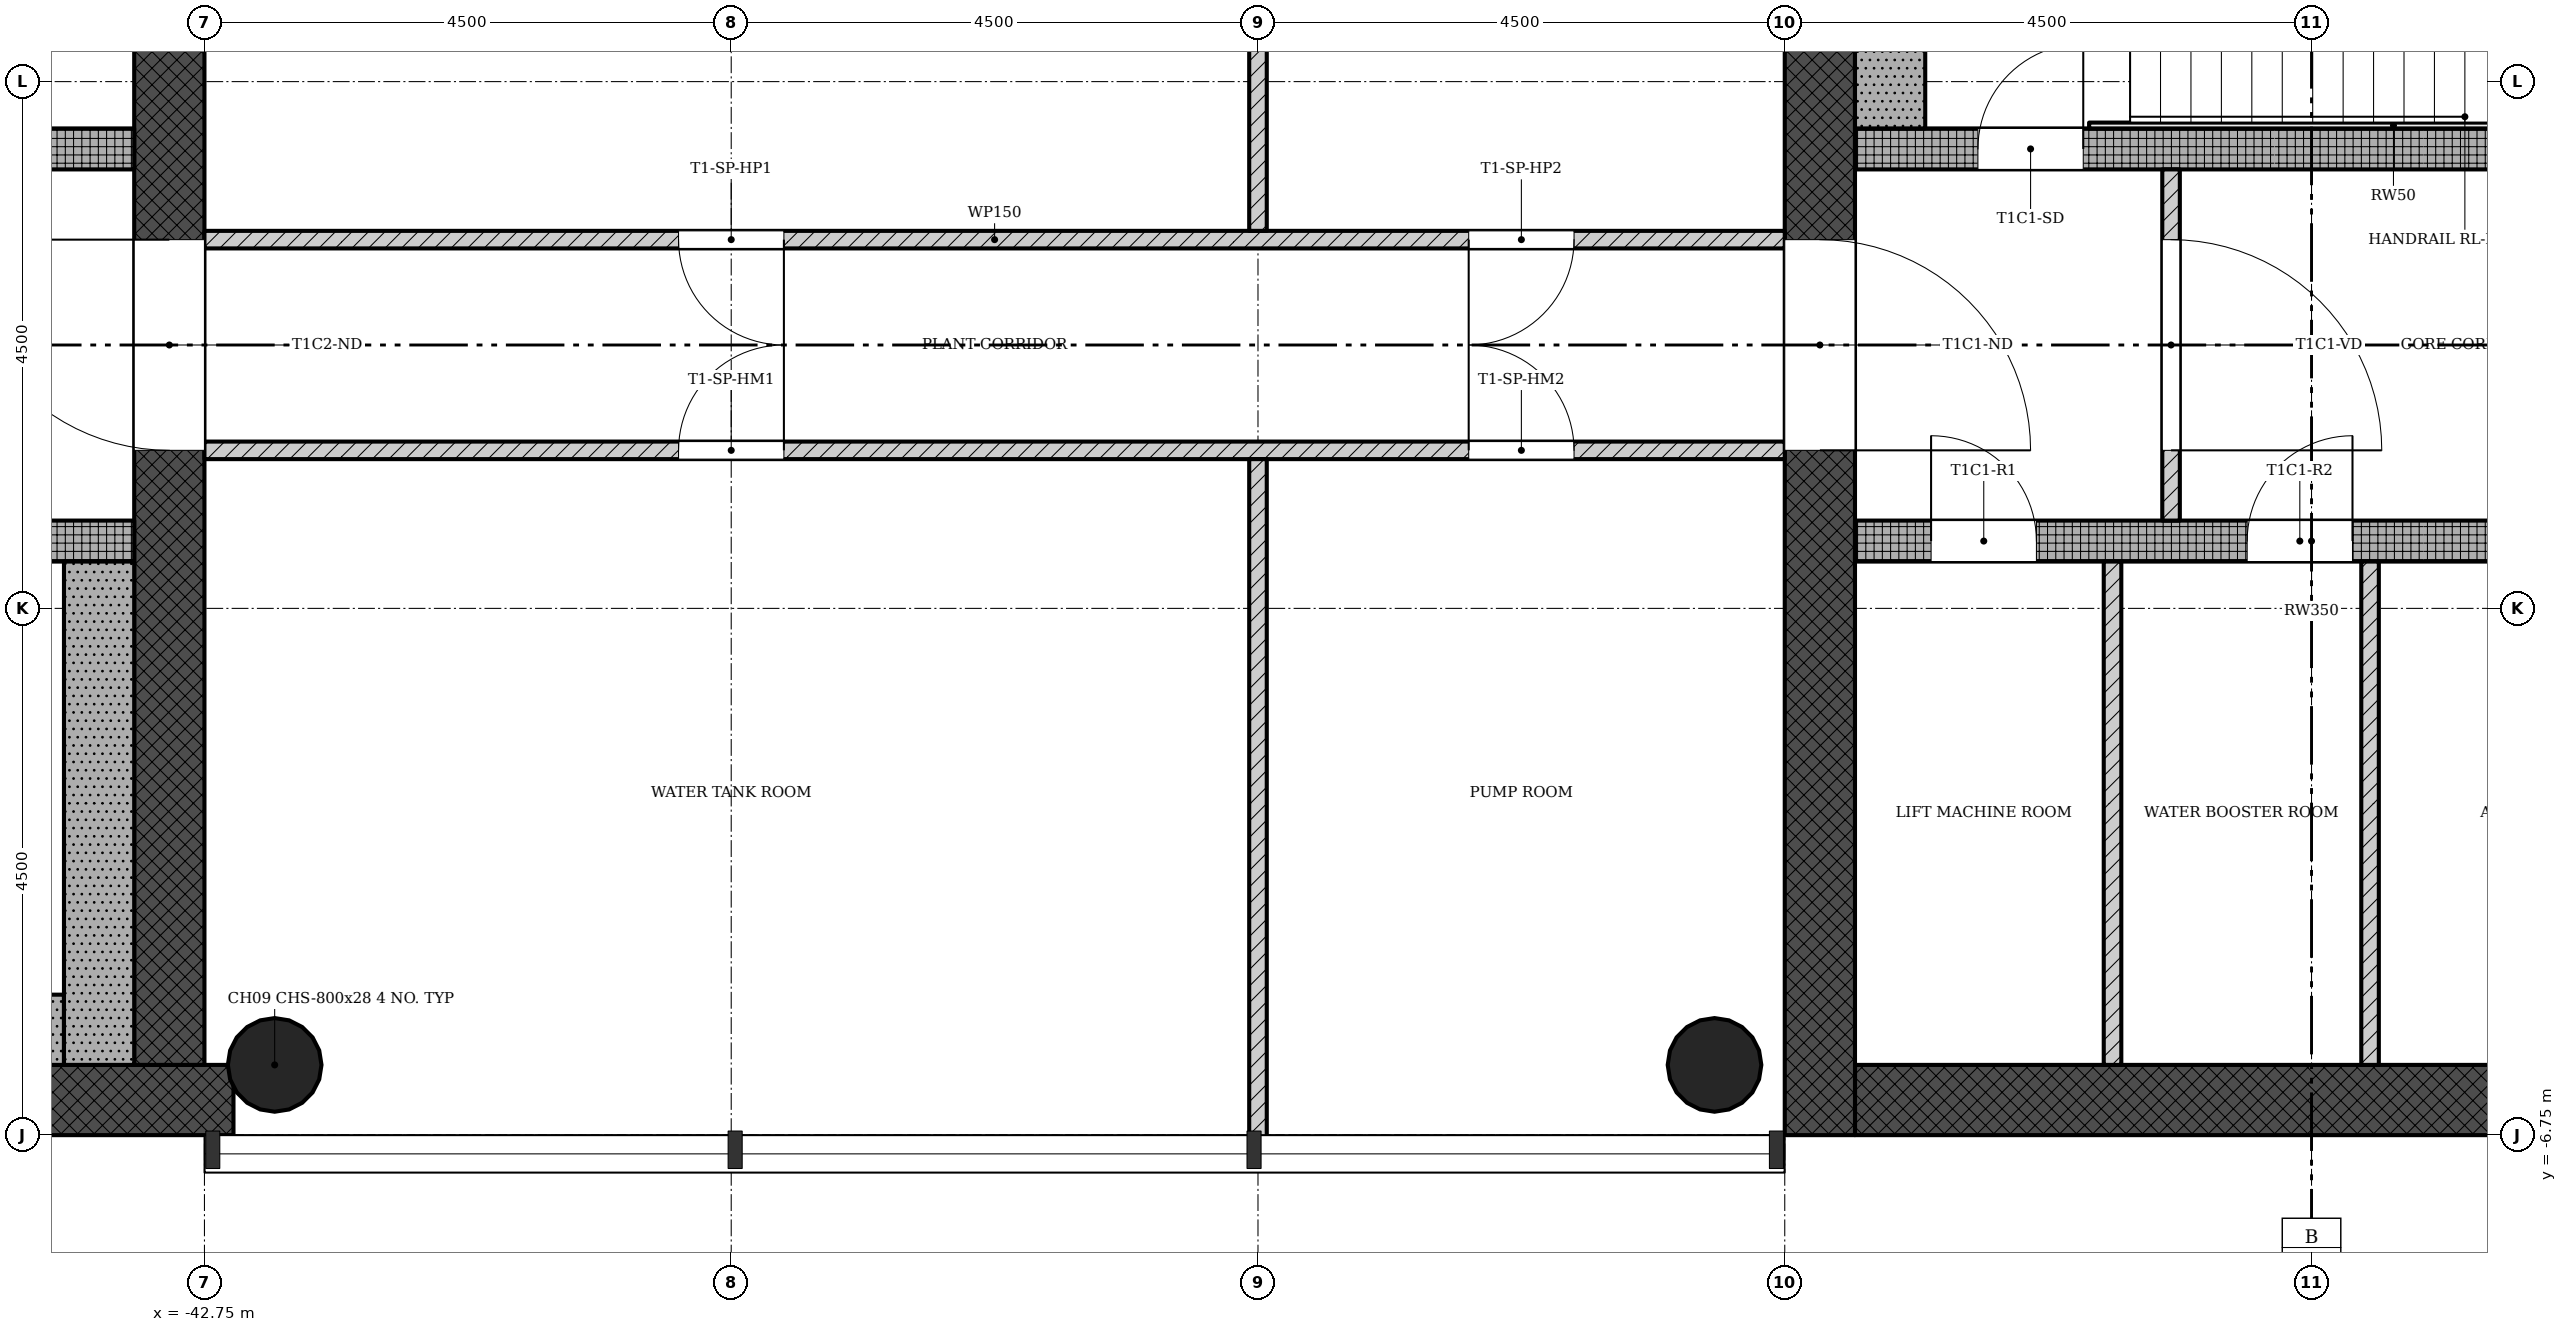
"""IFC4 building model, lengths in metres.
Left out: names, types, materials, properties, quantities, classifications, styles, units other than length and angle.
Written with IfcOpenShell. Run it as: python <this file> out.ifc"""

import sys

from ifc_helpers import new_model, si_unit, direction, frame, frame_2d, origin, origin_2d, place, context, subcontext, project, spatial, rectangle, hollow_circle, extrude, element, fill, save


model = new_model("IFC4")
c1 = context("Model", 3, precision=1e-05, world=origin(), true_north=direction((0.0, 1.0)))
c2 = subcontext(c1, "Body", "Model", "MODEL_VIEW")
j1 = project(units=[si_unit("LENGTHUNIT", "METRE"), si_unit("PLANEANGLEUNIT", "RADIAN")], contexts=[c1])
p1 = place(None, origin())
s1 = spatial("IfcSite", under=j1, at=p1, CompositionType="ELEMENT")
p2 = place(p1, origin())
s2 = spatial("IfcBuilding", under=s1, at=p2, CompositionType="ELEMENT")
p3 = place(p2, frame((0.0, 0.0, 255.9)))
s3 = spatial("IfcBuildingStorey", under=s2, at=p3, CompositionType="ELEMENT", Elevation=255.9)
p4 = place(p3, frame((-28.65, -6.45, 0.0), z_axis=(0.0, 0.0, 1.0), x_axis=(1.0, 0.0, 0.0)))
e1 = element("IfcWall", 1, at=p4, inside=s3, PredefinedType="SHEAR", context=c2, shape_type="SweptSolid", body=[
    extrude(rectangle(XDim=8.4, YDim=0.6, at=frame_2d((4.2, 0.0))), origin(), (0.0, 0.0, 1.0), 4.5),
])
p5 = place(p3, frame((-28.95, 6.15, 0.0), z_axis=(0.0, 0.0, 1.0), x_axis=(0.0, -1.0, 0.0)))
e2 = element("IfcWall", 2, at=p5, inside=s3, PredefinedType="SHEAR", context=c2, shape_type="SweptSolid", body=[
    extrude(rectangle(XDim=12.9, YDim=0.6, at=frame_2d((6.45, 0.0))), origin(), (0.0, 0.0, 1.0), 4.5),
])
p6 = place(p5, frame((5.25, 0.0, 0.0)))
e3 = element("IfcOpeningElement", 3, at=p6, cuts=e2, PredefinedType="OPENING", context=c2, shape_type="SweptSolid", body=[
    extrude(rectangle(XDim=1.8, YDim=2.1, at=frame_2d((0.9, 1.05))), frame((0.0, 0.31, 0.0), z_axis=(0.0, -1.0, 0.0), x_axis=(1.0, 0.0, 0.0)), (0.0, 0.0, 1.0), 0.62),
])
p7 = place(p3, frame((-28.65, -1.675, 0.0), z_axis=(0.0, 0.0, 1.0), x_axis=(1.0, 0.0, 0.0)))
e4 = element("IfcWall", 4, at=p7, inside=s3, PredefinedType="SHEAR", context=c2, shape_type="SweptSolid", body=[
    extrude(rectangle(XDim=7.8, YDim=0.35, at=frame_2d((3.9, 0.0))), origin(), (0.0, 0.0, 1.0), 4.5),
])
p8 = place(p7, frame((0.65, 0.0, 0.0)))
e5 = element("IfcOpeningElement", 5, at=p8, cuts=e4, PredefinedType="OPENING", context=c2, shape_type="SweptSolid", body=[
    extrude(rectangle(XDim=0.9, YDim=2.1, at=frame_2d((0.45, 1.05))), frame((0.0, 0.185, 0.0), z_axis=(0.0, -1.0, 0.0), x_axis=(1.0, 0.0, 0.0)), (0.0, 0.0, 1.0), 0.37),
])
p9 = place(p7, frame((3.35, 0.0, 0.0)))
e6 = element("IfcOpeningElement", 6, at=p9, cuts=e4, PredefinedType="OPENING", context=c2, shape_type="SweptSolid", body=[
    extrude(rectangle(XDim=0.9, YDim=2.1, at=frame_2d((0.45, 1.05))), frame((0.0, 0.185, 0.0), z_axis=(0.0, -1.0, 0.0), x_axis=(1.0, 0.0, 0.0)), (0.0, 0.0, 1.0), 0.37),
])
p10 = place(p7, frame((5.65, 0.0, 0.0)))
e7 = element("IfcOpeningElement", 7, at=p10, cuts=e4, PredefinedType="OPENING", context=c2, shape_type="SweptSolid", body=[
    extrude(rectangle(XDim=0.9, YDim=2.1, at=frame_2d((0.45, 1.05))), frame((0.0, 0.185, 0.0), z_axis=(0.0, -1.0, 0.0), x_axis=(1.0, 0.0, 0.0)), (0.0, 0.0, 1.0), 0.37),
])
p11 = place(p3, frame((-28.65, 1.675, 0.0), z_axis=(0.0, 0.0, 1.0), x_axis=(1.0, 0.0, 0.0)))
e8 = element("IfcWall", 8, at=p11, inside=s3, PredefinedType="SHEAR", context=c2, shape_type="SweptSolid", body=[
    extrude(rectangle(XDim=7.8, YDim=0.35, at=frame_2d((3.9, 0.0))), origin(), (0.0, 0.0, 1.0), 4.5),
])
p12 = place(p11, frame((1.05, 0.0, 0.0)))
e9 = element("IfcOpeningElement", 9, at=p12, cuts=e8, PredefinedType="OPENING", context=c2, shape_type="SweptSolid", body=[
    extrude(rectangle(XDim=0.9, YDim=2.1, at=frame_2d((0.45, 1.05))), frame((0.0, 0.185, 0.0), z_axis=(0.0, -1.0, 0.0), x_axis=(1.0, 0.0, 0.0)), (0.0, 0.0, 1.0), 0.37),
])
p13 = place(p3, frame((-51.15, -6.45, 0.0), z_axis=(0.0, 0.0, 1.0), x_axis=(1.0, 0.0, 0.0)))
e10 = element("IfcWall", 10, at=p13, inside=s3, PredefinedType="SHEAR", context=c2, shape_type="SweptSolid", body=[
    extrude(rectangle(XDim=8.648, YDim=0.6, at=frame_2d((4.324, 0.0))), origin(), (0.0, 0.0, 1.0), 4.5),
])
p14 = place(p3, frame((-43.05, -6.15, 0.0), z_axis=(0.0, 0.0, 1.0), x_axis=(0.0, 1.0, 0.0)))
e11 = element("IfcWall", 11, at=p14, inside=s3, PredefinedType="SHEAR", context=c2, shape_type="SweptSolid", body=[
    extrude(rectangle(XDim=12.9, YDim=0.6, at=frame_2d((6.45, 0.0))), origin(), (0.0, 0.0, 1.0), 4.5),
])
p15 = place(p14, frame((5.25, 0.0, 0.0)))
e12 = element("IfcOpeningElement", 12, at=p15, cuts=e11, PredefinedType="OPENING", context=c2, shape_type="SweptSolid", body=[
    extrude(rectangle(XDim=1.8, YDim=2.1, at=frame_2d((0.9, 1.05))), frame((0.0, 0.31, 0.0), z_axis=(0.0, -1.0, 0.0), x_axis=(1.0, 0.0, 0.0)), (0.0, 0.0, 1.0), 0.62),
])
p16 = place(p3, frame((-51.15, -1.675, 0.0), z_axis=(0.0, 0.0, 1.0), x_axis=(1.0, 0.0, 0.0)))
e13 = element("IfcWall", 13, at=p16, inside=s3, PredefinedType="SHEAR", context=c2, shape_type="SweptSolid", body=[
    extrude(rectangle(XDim=7.8, YDim=0.35, at=frame_2d((3.9, 0.0))), origin(), (0.0, 0.0, 1.0), 4.5),
])
p17 = place(p16, frame((5.85, 0.0, 0.0)))
e14 = element("IfcOpeningElement", 14, at=p17, cuts=e13, PredefinedType="OPENING", context=c2, shape_type="SweptSolid", body=[
    extrude(rectangle(XDim=0.9, YDim=2.1, at=frame_2d((0.45, 1.05))), frame((0.0, 0.185, 0.0), z_axis=(0.0, -1.0, 0.0), x_axis=(1.0, 0.0, 0.0)), (0.0, 0.0, 1.0), 0.37),
])
p18 = place(p3, frame((-51.15, 1.675, 0.0), z_axis=(0.0, 0.0, 1.0), x_axis=(1.0, 0.0, 0.0)))
e15 = element("IfcWall", 15, at=p18, inside=s3, PredefinedType="SHEAR", context=c2, shape_type="SweptSolid", body=[
    extrude(rectangle(XDim=7.8, YDim=0.35, at=frame_2d((3.9, 0.0))), origin(), (0.0, 0.0, 1.0), 4.5),
])
p19 = place(p18, frame((5.55, 0.0, 0.0)))
e16 = element("IfcOpeningElement", 16, at=p19, cuts=e15, PredefinedType="OPENING", context=c2, shape_type="SweptSolid", body=[
    extrude(rectangle(XDim=1.1, YDim=2.1, at=frame_2d((0.55, 1.05))), frame((0.0, 0.185, 0.0), z_axis=(0.0, -1.0, 0.0), x_axis=(1.0, 0.0, 0.0)), (0.0, 0.0, 1.0), 0.37),
])
p20 = place(p18, frame((3.95, 0.0, 0.0)))
e17 = element("IfcOpeningElement", 17, at=p20, cuts=e15, PredefinedType="OPENING", context=c2, shape_type="SweptSolid", body=[
    extrude(rectangle(XDim=0.9, YDim=2.1, at=frame_2d((0.45, 1.05))), frame((0.0, 0.185, 0.0), z_axis=(0.0, -1.0, 0.0), x_axis=(1.0, 0.0, 0.0)), (0.0, 0.0, 1.0), 0.37),
])
p21 = place(p18, frame((2.35, 0.0, 0.0)))
e18 = element("IfcOpeningElement", 18, at=p21, cuts=e15, PredefinedType="OPENING", context=c2, shape_type="SweptSolid", body=[
    extrude(rectangle(XDim=0.9, YDim=2.1, at=frame_2d((0.45, 1.05))), frame((0.0, 0.185, 0.0), z_axis=(0.0, -1.0, 0.0), x_axis=(1.0, 0.0, 0.0)), (0.0, 0.0, 1.0), 0.37),
])
p22 = place(p18, frame((0.45, 0.0, 0.0)))
e19 = element("IfcOpeningElement", 19, at=p22, cuts=e15, PredefinedType="OPENING", context=c2, shape_type="SweptSolid", body=[
    extrude(rectangle(XDim=0.9, YDim=2.1, at=frame_2d((0.45, 1.05))), frame((0.0, 0.185, 0.0), z_axis=(0.0, -1.0, 0.0), x_axis=(1.0, 0.0, 0.0)), (0.0, 0.0, 1.0), 0.37),
])
for number, where, z_axis, x_axis in (
    (20, (-42.15, -6.15, 0.0), (0.0, 0.0, 1.0), (1.0, 0.0, 0.0)),
    (21, (-29.85, -6.15, 0.0), (0.0, 0.0, 1.0), (1.0, 0.0, 0.0)),
):
    element("IfcColumn", number, at=place(p3, frame(where, z_axis=z_axis, x_axis=x_axis)), inside=s3, PredefinedType="COLUMN", context=c2, shape_type="SweptSolid", body=[
        extrude(hollow_circle(Radius=0.4, WallThickness=0.028, at=origin_2d()), origin(), (0.0, 0.0, 1.0), 4.5),
    ])
p23 = place(p3, frame((-25.95, -1.5, 0.0), z_axis=(0.0, 0.0, 1.0), x_axis=(0.0, 1.0, 0.0)))
e22 = element("IfcWall", 22, at=p23, inside=s3, PredefinedType="PARTITIONING", context=c2, shape_type="SweptSolid", body=[
    extrude(rectangle(XDim=3.0, YDim=0.15, at=frame_2d((1.5, 0.0))), origin(), (0.0, 0.0, 1.0), 4.1),
])
p24 = place(p23, frame((0.6, 0.0, 0.0)))
e23 = element("IfcOpeningElement", 23, at=p24, cuts=e22, PredefinedType="OPENING", context=c2, shape_type="SweptSolid", body=[
    extrude(rectangle(XDim=1.8, YDim=2.1, at=frame_2d((0.9, 1.05))), frame((0.0, 0.085, 0.0), z_axis=(0.0, -1.0, 0.0), x_axis=(1.0, 0.0, 0.0)), (0.0, 0.0, 1.0), 0.17),
])
for number, where, z_axis, x_axis in (
    (24, (-26.45, -6.15, 0.0), (0.0, 0.0, 1.0), (0.0, 1.0, 0.0)),
    (25, (-24.25, -6.15, 0.0), (0.0, 0.0, 1.0), (0.0, 1.0, 0.0)),
):
    element("IfcWall", number, at=place(p3, frame(where, z_axis=z_axis, x_axis=x_axis)), inside=s3, PredefinedType="PARTITIONING", context=c2, shape_type="SweptSolid", body=[
        extrude(rectangle(XDim=4.3, YDim=0.15, at=frame_2d((2.15, 0.0))), origin(), (0.0, 0.0, 1.0), 4.1),
    ])
p25 = place(p3, frame((-42.75, 0.9, 0.0), z_axis=(0.0, 0.0, 1.0), x_axis=(1.0, 0.0, 0.0)))
e26 = element("IfcWall", 26, at=p25, inside=s3, PredefinedType="PARTITIONING", context=c2, shape_type="SweptSolid", body=[
    extrude(rectangle(XDim=13.5, YDim=0.15, at=frame_2d((6.75, 0.0))), origin(), (0.0, 0.0, 1.0), 4.1),
])
p26 = place(p25, frame((4.05, 0.0, 0.0)))
e27 = element("IfcOpeningElement", 27, at=p26, cuts=e26, PredefinedType="OPENING", context=c2, shape_type="SweptSolid", body=[
    extrude(rectangle(XDim=0.9, YDim=2.1, at=frame_2d((0.45, 1.05))), frame((0.0, 0.085, 0.0), z_axis=(0.0, -1.0, 0.0), x_axis=(1.0, 0.0, 0.0)), (0.0, 0.0, 1.0), 0.17),
])
p27 = place(p25, frame((10.8, 0.0, 0.0)))
e28 = element("IfcOpeningElement", 28, at=p27, cuts=e26, PredefinedType="OPENING", context=c2, shape_type="SweptSolid", body=[
    extrude(rectangle(XDim=0.9, YDim=2.1, at=frame_2d((0.45, 1.05))), frame((0.0, 0.085, 0.0), z_axis=(0.0, -1.0, 0.0), x_axis=(1.0, 0.0, 0.0)), (0.0, 0.0, 1.0), 0.17),
])
p28 = place(p3, frame((-33.75, 0.975, 0.0), z_axis=(0.0, 0.0, 1.0), x_axis=(0.0, 1.0, 0.0)))
e29 = element("IfcWall", 29, at=p28, inside=s3, PredefinedType="PARTITIONING", context=c2, shape_type="SweptSolid", body=[
    extrude(rectangle(XDim=5.875, YDim=0.15, at=frame_2d((2.938, 0.0))), origin(), (0.0, 0.0, 1.0), 4.1),
])
p29 = place(p3, frame((-42.75, -0.9, 0.0), z_axis=(0.0, 0.0, 1.0), x_axis=(1.0, 0.0, 0.0)))
e30 = element("IfcWall", 30, at=p29, inside=s3, PredefinedType="PARTITIONING", context=c2, shape_type="SweptSolid", body=[
    extrude(rectangle(XDim=13.5, YDim=0.15, at=frame_2d((6.75, 0.0))), origin(), (0.0, 0.0, 1.0), 4.1),
])
p30 = place(p29, frame((4.05, 0.0, 0.0)))
e31 = element("IfcOpeningElement", 31, at=p30, cuts=e30, PredefinedType="OPENING", context=c2, shape_type="SweptSolid", body=[
    extrude(rectangle(XDim=0.9, YDim=2.1, at=frame_2d((0.45, 1.05))), frame((0.0, 0.085, 0.0), z_axis=(0.0, -1.0, 0.0), x_axis=(1.0, 0.0, 0.0)), (0.0, 0.0, 1.0), 0.17),
])
p31 = place(p29, frame((10.8, 0.0, 0.0)))
e32 = element("IfcOpeningElement", 32, at=p31, cuts=e30, PredefinedType="OPENING", context=c2, shape_type="SweptSolid", body=[
    extrude(rectangle(XDim=0.9, YDim=2.1, at=frame_2d((0.45, 1.05))), frame((0.0, 0.085, 0.0), z_axis=(0.0, -1.0, 0.0), x_axis=(1.0, 0.0, 0.0)), (0.0, 0.0, 1.0), 0.17),
])
p32 = place(p3, frame((-33.75, -0.975, 0.0), z_axis=(0.0, 0.0, 1.0), x_axis=(0.0, -1.0, 0.0)))
e33 = element("IfcWall", 33, at=p32, inside=s3, PredefinedType="PARTITIONING", context=c2, shape_type="SweptSolid", body=[
    extrude(rectangle(XDim=5.875, YDim=0.15, at=frame_2d((2.938, 0.0))), origin(), (0.0, 0.0, 1.0), 4.1),
])
p33 = place(p3, frame((-28.35, 1.85, 0.0), z_axis=(0.0, 0.0, 1.0), x_axis=(0.0, 1.0, 0.0)))
e34 = element("IfcWall", 34, at=p33, inside=s3, PredefinedType="SHEAR", context=c2, shape_type="SweptSolid", body=[
    extrude(rectangle(XDim=4.3, YDim=0.6, at=frame_2d((2.15, 0.0))), origin(), (0.0, 0.0, 1.0), 4.5),
])
p34 = place(p3, frame((-26.65, 1.875, 0.0), z_axis=(0.0, 0.0, 1.0), x_axis=(1.0, 0.0, 0.0)))
e35 = element("IfcWall", 35, at=p34, inside=s3, PredefinedType="SHEAR", context=c2, shape_type="SweptSolid", body=[
    extrude(rectangle(XDim=5.2, YDim=0.05, at=frame_2d((2.6, 0.0))), origin(), (0.0, 0.0, 1.0), 4.5),
])
p35 = place(p3, frame((-43.95, -5.85, 0.0), z_axis=(0.0, 0.0, 1.0), x_axis=(-1.0, 0.0, 0.0)))
e36 = element("IfcWall", 36, at=p35, inside=s3, PredefinedType="SHEAR", context=c2, shape_type="SweptSolid", body=[
    extrude(rectangle(XDim=6.6, YDim=0.6, at=frame_2d((3.3, 0.0))), origin(), (0.0, 0.0, 1.0), 4.5),
])
p36 = place(p3, frame((-43.65, -1.85, 0.0), z_axis=(0.0, 0.0, 1.0), x_axis=(0.0, -1.0, 0.0)))
e37 = element("IfcWall", 37, at=p36, inside=s3, PredefinedType="SHEAR", context=c2, shape_type="SweptSolid", body=[
    extrude(rectangle(XDim=4.3, YDim=0.6, at=frame_2d((2.15, 0.0))), origin(), (0.0, 0.0, 1.0), 4.5),
])
p37 = place(p24, origin())
e38 = element("IfcDoor", 38, at=p37, inside=s3, OperationType="SINGLE_SWING_LEFT", PredefinedType="DOOR", context=c2, shape_type="SweptSolid", body=[
    extrude(rectangle(XDim=1.8, YDim=2.1, at=frame_2d((0.9, 1.05))), frame((0.0, 0.025, 0.0), z_axis=(0.0, -1.0, 0.0), x_axis=(1.0, 0.0, 0.0)), (0.0, 0.0, 1.0), 0.05),
])
fill(e23, e38)
p38 = place(p26, origin())
e39 = element("IfcDoor", 39, at=p38, inside=s3, OperationType="SINGLE_SWING_RIGHT", PredefinedType="DOOR", context=c2, shape_type="SweptSolid", body=[
    extrude(rectangle(XDim=0.9, YDim=2.1, at=frame_2d((0.45, 1.05))), frame((0.0, 0.025, 0.0), z_axis=(0.0, -1.0, 0.0), x_axis=(1.0, 0.0, 0.0)), (0.0, 0.0, 1.0), 0.05),
])
fill(e27, e39)
p39 = place(p27, origin())
e40 = element("IfcDoor", 40, at=p39, inside=s3, OperationType="SINGLE_SWING_LEFT", PredefinedType="DOOR", context=c2, shape_type="SweptSolid", body=[
    extrude(rectangle(XDim=0.9, YDim=2.1, at=frame_2d((0.45, 1.05))), frame((0.0, 0.025, 0.0), z_axis=(0.0, -1.0, 0.0), x_axis=(1.0, 0.0, 0.0)), (0.0, 0.0, 1.0), 0.05),
])
fill(e28, e40)
p40 = place(p30, origin())
e41 = element("IfcDoor", 41, at=p40, inside=s3, OperationType="SINGLE_SWING_LEFT", PredefinedType="DOOR", context=c2, shape_type="SweptSolid", body=[
    extrude(rectangle(XDim=0.9, YDim=2.1, at=frame_2d((0.45, 1.05))), frame((0.0, 0.025, 0.0), z_axis=(0.0, -1.0, 0.0), x_axis=(1.0, 0.0, 0.0)), (0.0, 0.0, 1.0), 0.05),
])
fill(e31, e41)
p41 = place(p31, origin())
e42 = element("IfcDoor", 42, at=p41, inside=s3, OperationType="SINGLE_SWING_RIGHT", PredefinedType="DOOR", context=c2, shape_type="SweptSolid", body=[
    extrude(rectangle(XDim=0.9, YDim=2.1, at=frame_2d((0.45, 1.05))), frame((0.0, 0.025, 0.0), z_axis=(0.0, -1.0, 0.0), x_axis=(1.0, 0.0, 0.0)), (0.0, 0.0, 1.0), 0.05),
])
fill(e32, e42)
p42 = place(p12, origin())
e43 = element("IfcDoor", 43, at=p42, inside=s3, OperationType="SINGLE_SWING_LEFT", PredefinedType="DOOR", context=c2, shape_type="SweptSolid", body=[
    extrude(rectangle(XDim=0.9, YDim=2.1, at=frame_2d((0.45, 1.05))), frame((0.0, 0.025, 0.0), z_axis=(0.0, -1.0, 0.0), x_axis=(1.0, 0.0, 0.0)), (0.0, 0.0, 1.0), 0.05),
])
fill(e9, e43)
p43 = place(p8, origin())
e44 = element("IfcDoor", 44, at=p43, inside=s3, OperationType="SINGLE_SWING_RIGHT", PredefinedType="DOOR", context=c2, shape_type="SweptSolid", body=[
    extrude(rectangle(XDim=0.9, YDim=2.1, at=frame_2d((0.45, 1.05))), frame((0.0, 0.025, 0.0), z_axis=(0.0, -1.0, 0.0), x_axis=(1.0, 0.0, 0.0)), (0.0, 0.0, 1.0), 0.05),
])
fill(e5, e44)
p44 = place(p9, origin())
e45 = element("IfcDoor", 45, at=p44, inside=s3, OperationType="SINGLE_SWING_LEFT", PredefinedType="DOOR", context=c2, shape_type="SweptSolid", body=[
    extrude(rectangle(XDim=0.9, YDim=2.1, at=frame_2d((0.45, 1.05))), frame((0.0, 0.025, 0.0), z_axis=(0.0, -1.0, 0.0), x_axis=(1.0, 0.0, 0.0)), (0.0, 0.0, 1.0), 0.05),
])
fill(e6, e45)
p45 = place(p6, origin())
e46 = element("IfcDoor", 46, at=p45, inside=s3, OperationType="SINGLE_SWING_LEFT", PredefinedType="DOOR", context=c2, shape_type="SweptSolid", body=[
    extrude(rectangle(XDim=1.8, YDim=2.1, at=frame_2d((0.9, 1.05))), frame((0.0, 0.025, 0.0), z_axis=(0.0, -1.0, 0.0), x_axis=(1.0, 0.0, 0.0)), (0.0, 0.0, 1.0), 0.05),
])
fill(e3, e46)
p46 = place(p15, origin())
e47 = element("IfcDoor", 47, at=p46, inside=s3, OperationType="SINGLE_SWING_LEFT", PredefinedType="DOOR", context=c2, shape_type="SweptSolid", body=[
    extrude(rectangle(XDim=1.8, YDim=2.1, at=frame_2d((0.9, 1.05))), frame((0.0, 0.025, 0.0), z_axis=(0.0, -1.0, 0.0), x_axis=(1.0, 0.0, 0.0)), (0.0, 0.0, 1.0), 0.05),
])
fill(e12, e47)
save(model, sys.argv[1])
